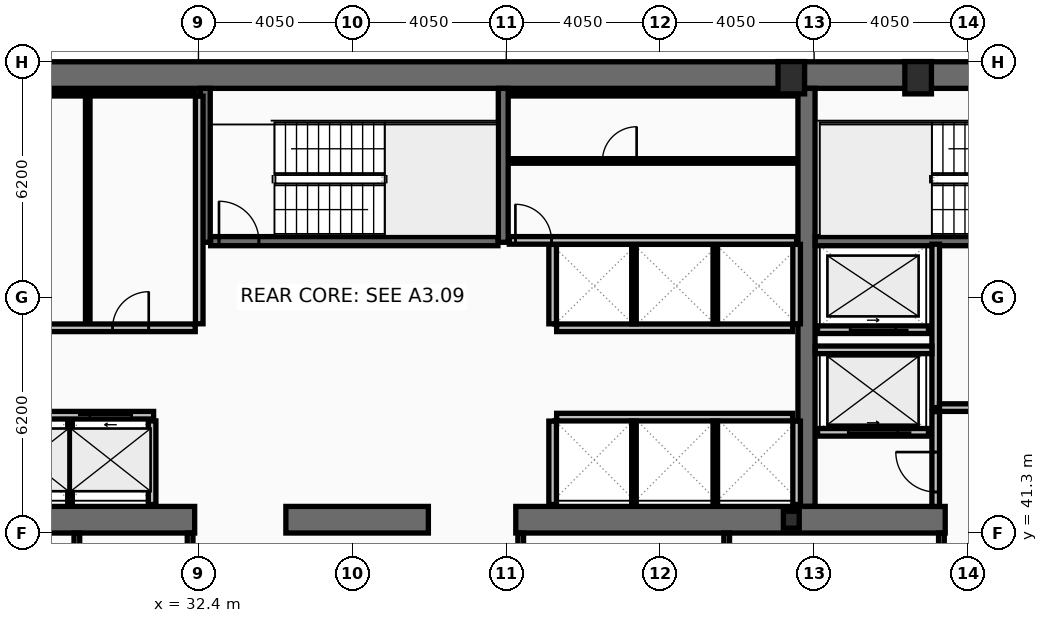
"""IFC4 building model, lengths in metres.
Left out: names, types, materials, properties, quantities, classifications, styles, units other than length and angle.
Written with IfcOpenShell. Run it as: python <this file> out.ifc"""

import sys

from ifc_helpers import new_model, si_unit, direction, frame, frame_2d, origin, origin_2d, place, context, subcontext, project, spatial, rectangle, hollow_rectangle, i_section, extrude, element, fill, save


model = new_model("IFC4")
c1 = context("Model", 3, precision=1e-05, world=origin(), true_north=direction((0.0, 1.0)))
c2 = subcontext(c1, "Body", "Model", "MODEL_VIEW")
j1 = project(units=[si_unit("LENGTHUNIT", "METRE"), si_unit("PLANEANGLEUNIT", "RADIAN")], contexts=[c1])
p1 = place(None, origin())
s1 = spatial("IfcSite", under=j1, at=p1, CompositionType="ELEMENT")
p2 = place(p1, origin())
s2 = spatial("IfcBuilding", under=s1, at=p2, CompositionType="ELEMENT")
p3 = place(p2, frame((0.0, 0.0, 165.0)))
s3 = spatial("IfcBuildingStorey", under=s2, at=p3, CompositionType="ELEMENT", Elevation=165.0)
p4 = place(p3, frame((16.2, 53.35, 0.0), z_axis=(0.0, 0.0, 1.0), x_axis=(1.0, 0.0, 0.0)))
e1 = element("IfcWall", 1, at=p4, inside=s3, PredefinedType="SHEAR", context=c2, shape_type="SweptSolid", body=[
    extrude(rectangle(XDim=40.5, YDim=0.7, at=frame_2d((20.25, 0.0))), origin(), (0.0, 0.0, 1.0), 3.44),
])
p5 = place(p3, frame((48.4, 42.0, 0.0), z_axis=(0.0, 0.0, 1.0), x_axis=(0.0, 1.0, 0.0)))
e2 = element("IfcWall", 2, at=p5, inside=s3, PredefinedType="SHEAR", context=c2, shape_type="SweptSolid", body=[
    extrude(rectangle(XDim=11.0, YDim=0.45, at=frame_2d((5.5, 0.0))), origin(), (0.0, 0.0, 1.0), 3.44),
])
p6 = place(p3, frame((32.3, 41.65, 0.0), z_axis=(0.0, 0.0, 1.0), x_axis=(-1.0, 0.0, 0.0)))
e3 = element("IfcWall", 3, at=p6, inside=s3, PredefinedType="SHEAR", context=c2, shape_type="SweptSolid", body=[
    extrude(rectangle(XDim=11.45, YDim=0.7, at=frame_2d((5.725, 0.0))), origin(), (0.0, 0.0, 1.0), 3.44),
])
p7 = place(p3, frame((38.45, 41.65, 0.0), z_axis=(0.0, 0.0, 1.0), x_axis=(-1.0, 0.0, 0.0)))
e4 = element("IfcWall", 4, at=p7, inside=s3, PredefinedType="SHEAR", context=c2, shape_type="SweptSolid", body=[
    extrude(rectangle(XDim=3.75, YDim=0.7, at=frame_2d((1.875, 0.0))), origin(), (0.0, 0.0, 1.0), 3.44),
])
p8 = place(p3, frame((52.05, 41.65, 0.0), z_axis=(0.0, 0.0, 1.0), x_axis=(-1.0, 0.0, 0.0)))
e5 = element("IfcWall", 5, at=p8, inside=s3, PredefinedType="SHEAR", context=c2, shape_type="SweptSolid", body=[
    extrude(rectangle(XDim=11.3, YDim=0.7, at=frame_2d((5.65, 0.0))), origin(), (0.0, 0.0, 1.0), 3.44),
])
for number, where, z_axis, x_axis in (
    (6, (32.58, 48.95, 0.0), (0.0, 0.0, 1.0), (0.0, 1.0, 0.0)),
    (7, (40.42, 48.95, 0.0), (0.0, 0.0, 1.0), (0.0, 1.0, 0.0)),
):
    element("IfcWall", number, at=place(p3, frame(where, z_axis=z_axis, x_axis=x_axis)), inside=s3, PredefinedType="SHEAR", context=c2, shape_type="SweptSolid", body=[
        extrude(rectangle(XDim=4.05, YDim=0.26, at=frame_2d((2.025, 0.0))), origin(), (0.0, 0.0, 1.0), 3.44),
    ])
p9 = place(p3, frame((48.63, 48.98, 0.0), z_axis=(0.0, 0.0, 1.0), x_axis=(1.0, 0.0, 0.0)))
e8 = element("IfcWall", 8, at=p9, inside=s3, PredefinedType="SHEAR", context=c2, shape_type="SweptSolid", body=[
    extrude(rectangle(XDim=7.37, YDim=0.24, at=frame_2d((3.685, 0.0))), origin(), (0.0, 0.0, 1.0), 3.44),
])
p10 = place(p9, frame((6.1, 0.0, 0.0)))
e9 = element("IfcOpeningElement", 9, at=p10, cuts=e8, PredefinedType="OPENING", context=c2, shape_type="SweptSolid", body=[
    extrude(rectangle(XDim=1.05, YDim=2.15, at=frame_2d((0.525, 1.075))), frame((0.0, 0.13, 0.0), z_axis=(0.0, -1.0, 0.0), x_axis=(1.0, 0.0, 0.0)), (0.0, 0.0, 1.0), 0.26),
])
p11 = place(p3, frame((32.72, 48.98, 0.0), z_axis=(0.0, 0.0, 1.0), x_axis=(1.0, 0.0, 0.0)))
e10 = element("IfcWall", 10, at=p11, inside=s3, PredefinedType="SHEAR", context=c2, shape_type="SweptSolid", body=[
    extrude(rectangle(XDim=7.56, YDim=0.24, at=frame_2d((3.78, 0.0))), origin(), (0.0, 0.0, 1.0), 3.44),
])
p12 = place(p11, frame((0.22, 0.0, 0.0)))
e11 = element("IfcOpeningElement", 11, at=p12, cuts=e10, PredefinedType="OPENING", context=c2, shape_type="SweptSolid", body=[
    extrude(rectangle(XDim=1.05, YDim=2.15, at=frame_2d((0.525, 1.075))), frame((0.0, 0.13, 0.0), z_axis=(0.0, -1.0, 0.0), x_axis=(1.0, 0.0, 0.0)), (0.0, 0.0, 1.0), 0.26),
])
for number, where, z_axis, x_axis in (
    (12, (48.0, 53.28, 0.0), (0.0, 0.0, 1.0), (1.0, 0.0, 0.0)),
    (13, (51.337, 53.28, 0.0), (0.0, 0.0, 1.0), (1.0, 0.0, 0.0)),
):
    element("IfcColumn", number, at=place(p3, frame(where, z_axis=z_axis, x_axis=x_axis)), inside=s3, PredefinedType="COLUMN", context=c2, shape_type="SweptSolid", body=[
        extrude(hollow_rectangle(XDim=0.7, YDim=0.85, WallThickness=0.05, at=origin_2d()), origin(), (0.0, 0.0, 1.0), 3.6),
    ])
p13 = place(p3, frame((48.0, 41.65, 0.0), z_axis=(0.0, 0.0, 1.0), x_axis=(1.0, 0.0, 0.0)))
e14 = element("IfcColumn", 14, at=p13, inside=s3, PredefinedType="COLUMN", context=c2, shape_type="SweptSolid", body=[
    extrude(i_section(OverallWidth=0.416, OverallDepth=0.446, WebThickness=0.039, FlangeThickness=0.063, at=origin_2d()), origin(), (0.0, 0.0, 1.0), 3.6),
])
p14 = place(p3, frame((24.69, 44.4, 0.0), z_axis=(0.0, 0.0, 1.0), x_axis=(1.0, 0.0, 0.0)))
e15 = element("IfcWall", 15, at=p14, inside=s3, PredefinedType="PARTITIONING", context=c2, shape_type="SweptSolid", body=[
    extrude(rectangle(XDim=6.53, YDim=0.2, at=frame_2d((3.265, 0.0))), origin(), (0.0, 0.0, 1.0), 3.44),
])
p15 = place(p14, frame((0.53, 0.0, 0.0)))
e16 = element("IfcOpeningElement", 16, at=p15, cuts=e15, PredefinedType="OPENING", context=c2, shape_type="SweptSolid", body=[
    extrude(rectangle(XDim=1.1, YDim=2.18, at=frame_2d((0.55, 1.09))), frame((0.0, 0.11, 0.0), z_axis=(0.0, -1.0, 0.0), x_axis=(1.0, 0.0, 0.0)), (0.0, 0.0, 1.0), 0.22),
])
p16 = place(p14, frame((2.69, 0.0, 0.0)))
e17 = element("IfcOpeningElement", 17, at=p16, cuts=e15, PredefinedType="OPENING", context=c2, shape_type="SweptSolid", body=[
    extrude(rectangle(XDim=1.1, YDim=2.18, at=frame_2d((0.55, 1.09))), frame((0.0, 0.11, 0.0), z_axis=(0.0, -1.0, 0.0), x_axis=(1.0, 0.0, 0.0)), (0.0, 0.0, 1.0), 0.22),
])
p17 = place(p14, frame((4.85, 0.0, 0.0)))
e18 = element("IfcOpeningElement", 18, at=p17, cuts=e15, PredefinedType="OPENING", context=c2, shape_type="SweptSolid", body=[
    extrude(rectangle(XDim=1.1, YDim=2.18, at=frame_2d((0.55, 1.09))), frame((0.0, 0.11, 0.0), z_axis=(0.0, -1.0, 0.0), x_axis=(1.0, 0.0, 0.0)), (0.0, 0.0, 1.0), 0.22),
])
p18 = place(p3, frame((51.61, 43.95, 0.0), z_axis=(0.0, 0.0, 1.0), x_axis=(-1.0, 0.0, 0.0)))
e19 = element("IfcWall", 19, at=p18, inside=s3, PredefinedType="PARTITIONING", context=c2, shape_type="SweptSolid", body=[
    extrude(rectangle(XDim=2.92, YDim=0.2, at=frame_2d((1.46, 0.0))), origin(), (0.0, 0.0, 1.0), 3.44),
])
p19 = place(p18, frame((0.81, 0.0, 0.0)))
e20 = element("IfcOpeningElement", 20, at=p19, cuts=e19, PredefinedType="OPENING", context=c2, shape_type="SweptSolid", body=[
    extrude(rectangle(XDim=1.3, YDim=2.18, at=frame_2d((0.65, 1.09))), frame((0.0, 0.11, 0.0), z_axis=(0.0, -1.0, 0.0), x_axis=(1.0, 0.0, 0.0)), (0.0, 0.0, 1.0), 0.22),
])
p20 = place(p3, frame((51.61, 46.65, 0.0), z_axis=(0.0, 0.0, 1.0), x_axis=(-1.0, 0.0, 0.0)))
e21 = element("IfcWall", 21, at=p20, inside=s3, PredefinedType="PARTITIONING", context=c2, shape_type="SweptSolid", body=[
    extrude(rectangle(XDim=2.92, YDim=0.2, at=frame_2d((1.46, 0.0))), origin(), (0.0, 0.0, 1.0), 3.44),
])
p21 = place(p20, frame((0.86, 0.0, 0.0)))
e22 = element("IfcOpeningElement", 22, at=p21, cuts=e21, PredefinedType="OPENING", context=c2, shape_type="SweptSolid", body=[
    extrude(rectangle(XDim=1.2, YDim=2.18, at=frame_2d((0.6, 1.09))), frame((0.0, 0.11, 0.0), z_axis=(0.0, -1.0, 0.0), x_axis=(1.0, 0.0, 0.0)), (0.0, 0.0, 1.0), 0.22),
])
p22 = place(p3, frame((51.8, 44.6, 0.0), z_axis=(0.0, 0.0, 1.0), x_axis=(0.0, 1.0, 0.0)))
e23 = element("IfcWall", 23, at=p22, inside=s3, PredefinedType="PARTITIONING", context=c2, shape_type="SweptSolid", body=[
    extrude(rectangle(XDim=4.3, YDim=0.2, at=frame_2d((2.15, 0.0))), origin(), (0.0, 0.0, 1.0), 3.44),
])
p23 = place(p3, frame((51.9, 44.6, 0.0), z_axis=(0.0, 0.0, 1.0), x_axis=(1.0, 0.0, 0.0)))
e24 = element("IfcWall", 24, at=p23, inside=s3, PredefinedType="PARTITIONING", context=c2, shape_type="SweptSolid", body=[
    extrude(rectangle(XDim=4.1, YDim=0.2, at=frame_2d((2.05, 0.0))), origin(), (0.0, 0.0, 1.0), 3.44),
])
p24 = place(p23, frame((1.15, 0.0, 0.0)))
e25 = element("IfcOpeningElement", 25, at=p24, cuts=e24, PredefinedType="OPENING", context=c2, shape_type="SweptSolid", body=[
    extrude(rectangle(XDim=1.05, YDim=2.15, at=frame_2d((0.525, 1.075))), frame((0.0, 0.11, 0.0), z_axis=(0.0, -1.0, 0.0), x_axis=(1.0, 0.0, 0.0)), (0.0, 0.0, 1.0), 0.22),
])
p25 = place(p3, frame((48.63, 46.12, 0.0), z_axis=(0.0, 0.0, 1.0), x_axis=(1.0, 0.0, 0.0)))
e26 = element("IfcWall", 26, at=p25, inside=s3, PredefinedType="PARTITIONING", context=c2, shape_type="SweptSolid", body=[
    extrude(rectangle(XDim=3.07, YDim=0.2, at=frame_2d((1.535, 0.0))), origin(), (0.0, 0.0, 1.0), 3.44),
])
p26 = place(p3, frame((51.8, 42.0, 0.0), z_axis=(0.0, 0.0, 1.0), x_axis=(0.0, 1.0, 0.0)))
e27 = element("IfcWall", 27, at=p26, inside=s3, PredefinedType="PARTITIONING", context=c2, shape_type="SweptSolid", body=[
    extrude(rectangle(XDim=2.495, YDim=0.2, at=frame_2d((1.248, 0.0))), origin(), (0.0, 0.0, 1.0), 3.44),
])
p27 = place(p26, frame((0.38, 0.0, 0.0)))
e28 = element("IfcOpeningElement", 28, at=p27, cuts=e27, PredefinedType="OPENING", context=c2, shape_type="SweptSolid", body=[
    extrude(rectangle(XDim=1.05, YDim=2.15, at=frame_2d((0.525, 1.075))), frame((0.0, 0.11, 0.0), z_axis=(0.0, -1.0, 0.0), x_axis=(1.0, 0.0, 0.0)), (0.0, 0.0, 1.0), 0.22),
])
p28 = place(p3, frame((32.42, 46.805, 0.0), z_axis=(0.0, 0.0, 1.0), x_axis=(0.0, 1.0, 0.0)))
e29 = element("IfcWall", 29, at=p28, inside=s3, PredefinedType="PARTITIONING", context=c2, shape_type="SweptSolid", body=[
    extrude(rectangle(XDim=5.99, YDim=0.2, at=frame_2d((2.995, 0.0))), origin(), (0.0, 0.0, 1.0), 3.44),
])
p29 = place(p3, frame((24.805, 52.86, 0.0), z_axis=(0.0, 0.0, 1.0), x_axis=(1.0, 0.0, 0.0)))
e30 = element("IfcWall", 30, at=p29, inside=s3, PredefinedType="PARTITIONING", context=c2, shape_type="SweptSolid", body=[
    extrude(rectangle(XDim=7.51, YDim=0.12, at=frame_2d((3.755, 0.0))), origin(), (0.0, 0.0, 1.0), 3.44),
])
p30 = place(p3, frame((29.486, 46.805, 0.0), z_axis=(0.0, 0.0, 1.0), x_axis=(0.0, 1.0, 0.0)))
e31 = element("IfcWall", 31, at=p30, inside=s3, PredefinedType="PARTITIONING", context=c2, shape_type="SweptSolid", body=[
    extrude(rectangle(XDim=5.99, YDim=0.12, at=frame_2d((2.995, 0.0))), origin(), (0.0, 0.0, 1.0), 3.44),
])
p31 = place(p3, frame((24.805, 46.7, 0.0), z_axis=(0.0, 0.0, 1.0), x_axis=(1.0, 0.0, 0.0)))
e32 = element("IfcWall", 32, at=p31, inside=s3, PredefinedType="PARTITIONING", context=c2, shape_type="SweptSolid", body=[
    extrude(rectangle(XDim=7.51, YDim=0.2, at=frame_2d((3.755, 0.0))), origin(), (0.0, 0.0, 1.0), 3.44),
])
p32 = place(p31, frame((1.15, 0.0, 0.0)))
e33 = element("IfcOpeningElement", 33, at=p32, cuts=e32, PredefinedType="OPENING", context=c2, shape_type="SweptSolid", body=[
    extrude(rectangle(XDim=0.95, YDim=2.1, at=frame_2d((0.475, 1.05))), frame((0.0, 0.11, 0.0), z_axis=(0.0, -1.0, 0.0), x_axis=(1.0, 0.0, 0.0)), (0.0, 0.0, 1.0), 0.22),
])
p33 = place(p31, frame((5.336, 0.0, 0.0)))
e34 = element("IfcOpeningElement", 34, at=p33, cuts=e32, PredefinedType="OPENING", context=c2, shape_type="SweptSolid", body=[
    extrude(rectangle(XDim=0.95, YDim=2.1, at=frame_2d((0.475, 1.05))), frame((0.0, 0.11, 0.0), z_axis=(0.0, -1.0, 0.0), x_axis=(1.0, 0.0, 0.0)), (0.0, 0.0, 1.0), 0.22),
])
p34 = place(p3, frame((31.18, 42.05, 0.0), z_axis=(0.0, 0.0, 1.0), x_axis=(0.0, 1.0, 0.0)))
e35 = element("IfcWall", 35, at=p34, inside=s3, PredefinedType="PARTITIONING", context=c2, shape_type="SweptSolid", body=[
    extrude(rectangle(XDim=2.2, YDim=0.2, at=frame_2d((1.1, 0.0))), origin(), (0.0, 0.0, 1.0), 3.44),
])
p35 = place(p3, frame((29.02, 42.05, 0.0), z_axis=(0.0, 0.0, 1.0), x_axis=(0.0, 1.0, 0.0)))
e36 = element("IfcWall", 36, at=p35, inside=s3, PredefinedType="PARTITIONING", context=c2, shape_type="SweptSolid", body=[
    extrude(rectangle(XDim=2.2, YDim=0.12, at=frame_2d((1.1, 0.0))), origin(), (0.0, 0.0, 1.0), 3.44),
])
p36 = place(p3, frame((41.825, 46.7, 0.0), z_axis=(0.0, 0.0, 1.0), x_axis=(1.0, 0.0, 0.0)))
e37 = element("IfcWall", 37, at=p36, inside=s3, PredefinedType="PARTITIONING", context=c2, shape_type="SweptSolid", body=[
    extrude(rectangle(XDim=6.21, YDim=0.2, at=frame_2d((3.105, 0.0))), origin(), (0.0, 0.0, 1.0), 3.44),
])
for number, where, z_axis, x_axis in (
    (38, (41.72, 46.805, 0.0), (0.0, 0.0, 1.0), (0.0, 1.0, 0.0)),
    (39, (48.14, 46.805, 0.0), (0.0, 0.0, 1.0), (0.0, 1.0, 0.0)),
):
    element("IfcWall", number, at=place(p3, frame(where, z_axis=z_axis, x_axis=x_axis)), inside=s3, PredefinedType="PARTITIONING", context=c2, shape_type="SweptSolid", body=[
        extrude(rectangle(XDim=2.09, YDim=0.2, at=frame_2d((1.045, 0.0))), origin(), (0.0, 0.0, 1.0), 3.44),
    ])
for number, where, z_axis, x_axis in (
    (40, (43.86, 46.805, 0.0), (0.0, 0.0, 1.0), (0.0, 1.0, 0.0)),
    (41, (46.0, 46.805, 0.0), (0.0, 0.0, 1.0), (0.0, 1.0, 0.0)),
):
    element("IfcWall", number, at=place(p3, frame(where, z_axis=z_axis, x_axis=x_axis)), inside=s3, PredefinedType="PARTITIONING", context=c2, shape_type="SweptSolid", body=[
        extrude(rectangle(XDim=2.09, YDim=0.12, at=frame_2d((1.045, 0.0))), origin(), (0.0, 0.0, 1.0), 3.44),
    ])
p37 = place(p3, frame((41.825, 44.35, 0.0), z_axis=(0.0, 0.0, 1.0), x_axis=(1.0, 0.0, 0.0)))
e42 = element("IfcWall", 42, at=p37, inside=s3, PredefinedType="PARTITIONING", context=c2, shape_type="SweptSolid", body=[
    extrude(rectangle(XDim=6.21, YDim=0.2, at=frame_2d((3.105, 0.0))), origin(), (0.0, 0.0, 1.0), 3.44),
])
for number, where, z_axis, x_axis in (
    (43, (41.72, 42.05, 0.0), (0.0, 0.0, 1.0), (0.0, 1.0, 0.0)),
    (44, (48.14, 42.05, 0.0), (0.0, 0.0, 1.0), (0.0, 1.0, 0.0)),
):
    element("IfcWall", number, at=place(p3, frame(where, z_axis=z_axis, x_axis=x_axis)), inside=s3, PredefinedType="PARTITIONING", context=c2, shape_type="SweptSolid", body=[
        extrude(rectangle(XDim=2.195, YDim=0.2, at=frame_2d((1.098, 0.0))), origin(), (0.0, 0.0, 1.0), 3.44),
    ])
for number, where, z_axis, x_axis in (
    (45, (43.86, 42.05, 0.0), (0.0, 0.0, 1.0), (0.0, 1.0, 0.0)),
    (46, (46.0, 42.05, 0.0), (0.0, 0.0, 1.0), (0.0, 1.0, 0.0)),
):
    element("IfcWall", number, at=place(p3, frame(where, z_axis=z_axis, x_axis=x_axis)), inside=s3, PredefinedType="PARTITIONING", context=c2, shape_type="SweptSolid", body=[
        extrude(rectangle(XDim=2.195, YDim=0.12, at=frame_2d((1.098, 0.0))), origin(), (0.0, 0.0, 1.0), 3.44),
    ])
p38 = place(p3, frame((40.58, 52.86, 0.0), z_axis=(0.0, 0.0, 1.0), x_axis=(1.0, 0.0, 0.0)))
e47 = element("IfcWall", 47, at=p38, inside=s3, PredefinedType="PARTITIONING", context=c2, shape_type="SweptSolid", body=[
    extrude(rectangle(XDim=7.56, YDim=0.12, at=frame_2d((3.78, 0.0))), origin(), (0.0, 0.0, 1.0), 3.44),
])
p39 = place(p3, frame((40.58, 49.0, 0.0), z_axis=(0.0, 0.0, 1.0), x_axis=(1.0, 0.0, 0.0)))
e48 = element("IfcWall", 48, at=p39, inside=s3, PredefinedType="PARTITIONING", context=c2, shape_type="SweptSolid", body=[
    extrude(rectangle(XDim=7.56, YDim=0.2, at=frame_2d((3.78, 0.0))), origin(), (0.0, 0.0, 1.0), 3.44),
])
p40 = place(p39, frame((0.16, 0.0, 0.0)))
e49 = element("IfcOpeningElement", 49, at=p40, cuts=e48, PredefinedType="OPENING", context=c2, shape_type="SweptSolid", body=[
    extrude(rectangle(XDim=0.95, YDim=2.1, at=frame_2d((0.475, 1.05))), frame((0.0, 0.11, 0.0), z_axis=(0.0, -1.0, 0.0), x_axis=(1.0, 0.0, 0.0)), (0.0, 0.0, 1.0), 0.22),
])
p41 = place(p3, frame((40.63, 51.09, 0.0), z_axis=(0.0, 0.0, 1.0), x_axis=(1.0, 0.0, 0.0)))
e50 = element("IfcWall", 50, at=p41, inside=s3, PredefinedType="PARTITIONING", context=c2, shape_type="SweptSolid", body=[
    extrude(rectangle(XDim=7.46, YDim=0.12, at=frame_2d((3.73, 0.0))), origin(), (0.0, 0.0, 1.0), 3.44),
])
p42 = place(p41, frame((2.4, 0.0, 0.0)))
e51 = element("IfcOpeningElement", 51, at=p42, cuts=e50, PredefinedType="OPENING", context=c2, shape_type="SweptSolid", body=[
    extrude(rectangle(XDim=0.9, YDim=2.05, at=frame_2d((0.45, 1.025))), frame((0.0, 0.07, 0.0), z_axis=(0.0, -1.0, 0.0), x_axis=(1.0, 0.0, 0.0)), (0.0, 0.0, 1.0), 0.14),
])
for number, where, z_axis, x_axis in (
    (52, (29.2, 38.28, 0.0), (0.0, 0.0, 1.0), (0.0, 1.0, 0.0)),
    (53, (32.18, 38.28, 0.0), (0.0, 0.0, 1.0), (0.0, 1.0, 0.0)),
    (54, (40.88, 38.28, 0.0), (0.0, 0.0, 1.0), (0.0, 1.0, 0.0)),
    (55, (46.3, 38.28, 0.0), (0.0, 0.0, 1.0), (0.0, 1.0, 0.0)),
    (56, (51.95, 38.28, 0.0), (0.0, 0.0, 1.0), (0.0, 1.0, 0.0)),
):
    element("IfcWall", number, at=place(p3, frame(where, z_axis=z_axis, x_axis=x_axis)), inside=s3, PredefinedType="PARTITIONING", context=c2, shape_type="SweptSolid", body=[
        extrude(rectangle(XDim=3.02, YDim=0.15, at=frame_2d((1.51, 0.0))), origin(), (0.0, 0.0, 1.0), 3.44),
    ])
p43 = place(p12, origin())
e57 = element("IfcDoor", 57, at=p43, inside=s3, OperationType="SINGLE_SWING_LEFT", PredefinedType="DOOR", context=c2, shape_type="SweptSolid", body=[
    extrude(rectangle(XDim=1.05, YDim=2.15, at=frame_2d((0.525, 1.075))), frame((0.0, 0.025, 0.0), z_axis=(0.0, -1.0, 0.0), x_axis=(1.0, 0.0, 0.0)), (0.0, 0.0, 1.0), 0.05),
])
fill(e11, e57)
p44 = place(p17, origin())
e58 = element("IfcDoor", 58, at=p44, inside=s3, OperationType="SLIDING_TO_LEFT", PredefinedType="DOOR", context=c2, shape_type="SweptSolid", body=[
    extrude(rectangle(XDim=1.1, YDim=2.18, at=frame_2d((0.55, 1.09))), frame((0.0, 0.025, 0.0), z_axis=(0.0, -1.0, 0.0), x_axis=(1.0, 0.0, 0.0)), (0.0, 0.0, 1.0), 0.05),
])
fill(e18, e58)
p45 = place(p19, origin())
e59 = element("IfcDoor", 59, at=p45, inside=s3, OperationType="SLIDING_TO_LEFT", PredefinedType="DOOR", context=c2, shape_type="SweptSolid", body=[
    extrude(rectangle(XDim=1.3, YDim=2.18, at=frame_2d((0.65, 1.09))), frame((0.0, 0.025, 0.0), z_axis=(0.0, -1.0, 0.0), x_axis=(1.0, 0.0, 0.0)), (0.0, 0.0, 1.0), 0.05),
])
fill(e20, e59)
p46 = place(p21, origin())
e60 = element("IfcDoor", 60, at=p46, inside=s3, OperationType="SLIDING_TO_LEFT", PredefinedType="DOOR", context=c2, shape_type="SweptSolid", body=[
    extrude(rectangle(XDim=1.2, YDim=2.18, at=frame_2d((0.6, 1.09))), frame((0.0, 0.025, 0.0), z_axis=(0.0, -1.0, 0.0), x_axis=(1.0, 0.0, 0.0)), (0.0, 0.0, 1.0), 0.05),
])
fill(e22, e60)
p47 = place(p27, origin())
e61 = element("IfcDoor", 61, at=p47, inside=s3, OperationType="SINGLE_SWING_RIGHT", PredefinedType="DOOR", context=c2, shape_type="SweptSolid", body=[
    extrude(rectangle(XDim=1.05, YDim=2.15, at=frame_2d((0.525, 1.075))), frame((0.0, 0.025, 0.0), z_axis=(0.0, -1.0, 0.0), x_axis=(1.0, 0.0, 0.0)), (0.0, 0.0, 1.0), 0.05),
])
fill(e28, e61)
p48 = place(p33, origin())
e62 = element("IfcDoor", 62, at=p48, inside=s3, OperationType="SINGLE_SWING_RIGHT", PredefinedType="DOOR", context=c2, shape_type="SweptSolid", body=[
    extrude(rectangle(XDim=0.95, YDim=2.1, at=frame_2d((0.475, 1.05))), frame((0.0, 0.025, 0.0), z_axis=(0.0, -1.0, 0.0), x_axis=(1.0, 0.0, 0.0)), (0.0, 0.0, 1.0), 0.05),
])
fill(e34, e62)
p49 = place(p40, origin())
e63 = element("IfcDoor", 63, at=p49, inside=s3, OperationType="SINGLE_SWING_LEFT", PredefinedType="DOOR", context=c2, shape_type="SweptSolid", body=[
    extrude(rectangle(XDim=0.95, YDim=2.1, at=frame_2d((0.475, 1.05))), frame((0.0, 0.025, 0.0), z_axis=(0.0, -1.0, 0.0), x_axis=(1.0, 0.0, 0.0)), (0.0, 0.0, 1.0), 0.05),
])
fill(e49, e63)
p50 = place(p42, origin())
e64 = element("IfcDoor", 64, at=p50, inside=s3, OperationType="SINGLE_SWING_RIGHT", PredefinedType="DOOR", context=c2, shape_type="SweptSolid", body=[
    extrude(rectangle(XDim=0.9, YDim=2.05, at=frame_2d((0.45, 1.025))), frame((0.0, 0.025, 0.0), z_axis=(0.0, -1.0, 0.0), x_axis=(1.0, 0.0, 0.0)), (0.0, 0.0, 1.0), 0.05),
])
fill(e51, e64)
save(model, sys.argv[1])
